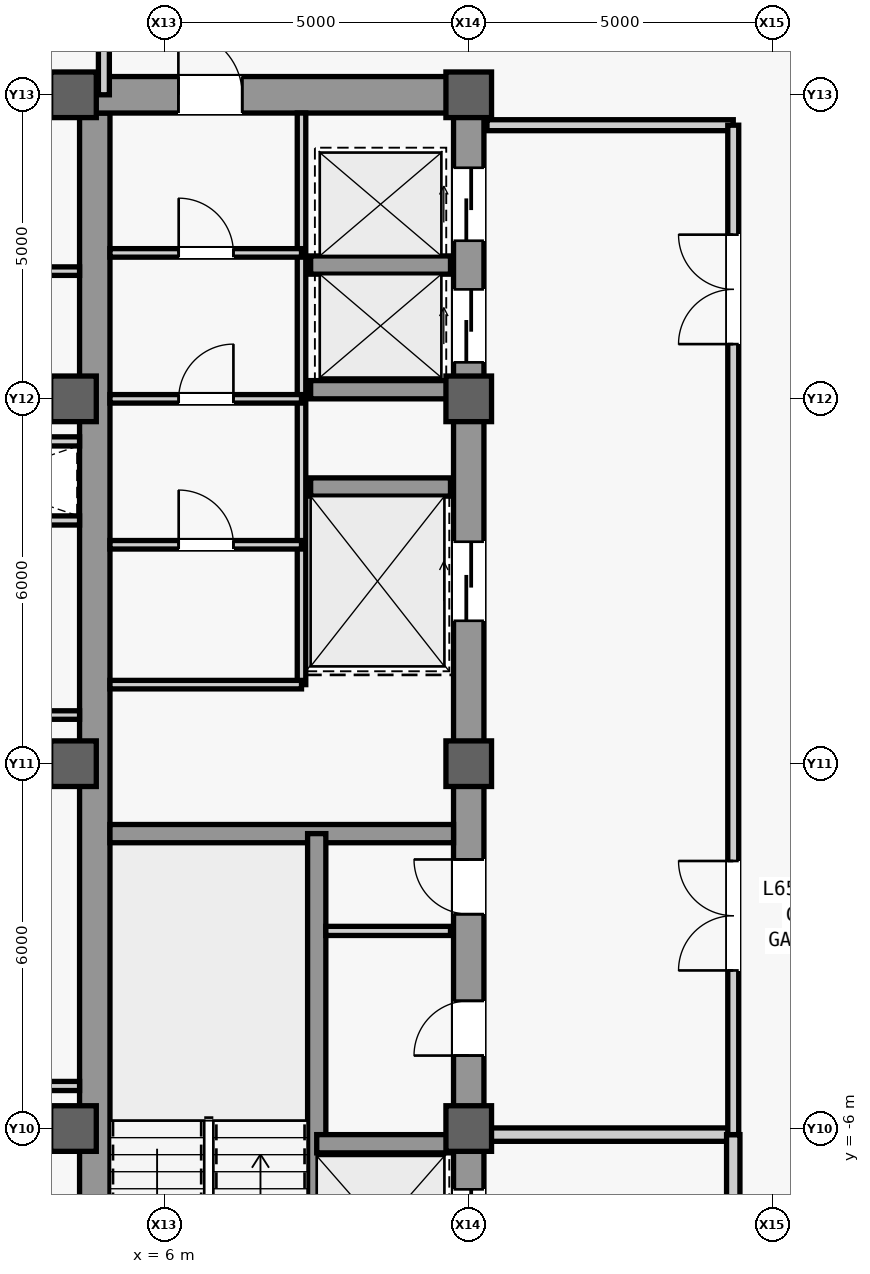
"""IFC4 building model, lengths in metres.
Left out: names, types, materials, properties, quantities, classifications, styles, units other than length and angle.
Written with IfcOpenShell. Run it as: python <this file> out.ifc"""

import sys

from ifc_helpers import new_model, si_unit, direction, frame, frame_2d, origin, origin_2d, place, context, subcontext, project, spatial, rectangle, extrude, source, transform, mapped, element, fill, save


model = new_model("IFC4")
c1 = context("Model", 3, precision=1e-05, world=origin(), true_north=direction((0.0, 1.0)))
c2 = subcontext(c1, "Body", "Model", "MODEL_VIEW")
j1 = project(units=[si_unit("LENGTHUNIT", "METRE"), si_unit("PLANEANGLEUNIT", "RADIAN")], contexts=[c1])
p1 = place(None, origin())
s1 = spatial("IfcSite", under=j1, at=p1, CompositionType="ELEMENT")
p2 = place(p1, origin())
s2 = spatial("IfcBuilding", under=s1, at=p2, CompositionType="ELEMENT")
p3 = place(p2, frame((0.0, 0.0, 277.5)))
s3 = spatial("IfcBuildingStorey", under=s2, at=p3, CompositionType="ELEMENT", Elevation=277.5)
m1 = source(origin(), c2, "Body", "SweptSolid", [
    extrude(rectangle(XDim=22.0, YDim=0.5, at=frame_2d((11.0, 0.0))), origin(), (0.0, 0.0, 1.0), 3.78),
])
p4 = place(p3, frame((11.0, -11.0, 0.0), z_axis=(0.0, 0.0, 1.0), x_axis=(0.0, 1.0, 0.0)))
e1 = element("IfcWall", 1, at=p4, inside=s3, PredefinedType="SHEAR", context=c2, shape_type="MappedRepresentation", body=[
    mapped(m1, transform((0.0, 0.0, 0.0), scale=1.0)),
])
m2 = source(origin(), c2, "Body", "SweptSolid", [
    extrude(rectangle(XDim=1.1, YDim=2.2, at=frame_2d((0.55, 1.1))), frame((0.0, 0.26, 0.0), z_axis=(0.0, -1.0, 0.0), x_axis=(1.0, 0.0, 0.0)), (0.0, 0.0, 1.0), 0.52),
])
p5 = place(p4, frame((0.8, 0.0, 0.0)))
e2 = element("IfcOpeningElement", 2, at=p5, cuts=e1, PredefinedType="OPENING", context=c2, shape_type="MappedRepresentation", body=[
    mapped(m2, transform((0.0, 0.0, 0.0), scale=1.0)),
])
m3 = source(origin(), c2, "Body", "SweptSolid", [
    extrude(rectangle(XDim=0.9, YDim=2.15, at=frame_2d((0.45, 1.075))), frame((0.0, 0.26, 0.0), z_axis=(0.0, -1.0, 0.0), x_axis=(1.0, 0.0, 0.0)), (0.0, 0.0, 1.0), 0.52),
])
p6 = place(p4, frame((6.2, 0.0, 0.0)))
e3 = element("IfcOpeningElement", 3, at=p6, cuts=e1, PredefinedType="OPENING", context=c2, shape_type="MappedRepresentation", body=[
    mapped(m3, transform((0.0, 0.0, 0.0), scale=1.0)),
])
p7 = place(p4, frame((8.525, 0.0, 0.0)))
e4 = element("IfcOpeningElement", 4, at=p7, cuts=e1, PredefinedType="OPENING", context=c2, shape_type="MappedRepresentation", body=[
    mapped(m3, transform((0.0, 0.0, 0.0), scale=1.0)),
])
m4 = source(origin(), c2, "Body", "SweptSolid", [
    extrude(rectangle(XDim=1.2, YDim=2.3, at=frame_2d((0.6, 1.15))), frame((0.0, 0.26, 0.0), z_axis=(0.0, -1.0, 0.0), x_axis=(1.0, 0.0, 0.0)), (0.0, 0.0, 1.0), 0.52),
])
p8 = place(p4, frame((17.6, 0.0, 0.0)))
e5 = element("IfcOpeningElement", 5, at=p8, cuts=e1, PredefinedType="OPENING", context=c2, shape_type="MappedRepresentation", body=[
    mapped(m4, transform((0.0, 0.0, 0.0), scale=1.0)),
])
p9 = place(p4, frame((19.6, 0.0, 0.0)))
e6 = element("IfcOpeningElement", 6, at=p9, cuts=e1, PredefinedType="OPENING", context=c2, shape_type="MappedRepresentation", body=[
    mapped(m4, transform((0.0, 0.0, 0.0), scale=1.0)),
])
m5 = source(origin(), c2, "Body", "SweptSolid", [
    extrude(rectangle(XDim=1.3, YDim=2.3, at=frame_2d((0.65, 1.15))), frame((0.0, 0.26, 0.0), z_axis=(0.0, -1.0, 0.0), x_axis=(1.0, 0.0, 0.0)), (0.0, 0.0, 1.0), 0.52),
])
p10 = place(p4, frame((2.7, 0.0, 0.0)))
e7 = element("IfcOpeningElement", 7, at=p10, cuts=e1, PredefinedType="OPENING", context=c2, shape_type="MappedRepresentation", body=[
    mapped(m5, transform((0.0, 0.0, 0.0), scale=1.0)),
])
p11 = place(p4, frame((13.35, 0.0, 0.0)))
e8 = element("IfcOpeningElement", 8, at=p11, cuts=e1, PredefinedType="OPENING", context=c2, shape_type="MappedRepresentation", body=[
    mapped(m5, transform((0.0, 0.0, 0.0), scale=1.0)),
])
m6 = source(origin(), c2, "Body", "SweptSolid", [
    extrude(rectangle(XDim=21.4, YDim=0.5, at=frame_2d((10.7, 0.0))), origin(), (0.0, 0.0, 1.0), 3.78),
])
p12 = place(p3, frame((4.85, -10.7, 0.0), z_axis=(0.0, 0.0, 1.0), x_axis=(0.0, 1.0, 0.0)))
e9 = element("IfcWall", 9, at=p12, inside=s3, PredefinedType="SHEAR", context=c2, shape_type="MappedRepresentation", body=[
    mapped(m6, transform((0.0, 0.0, 0.0), scale=1.0)),
])
m7 = source(origin(), c2, "Body", "SweptSolid", [
    extrude(rectangle(XDim=5.9, YDim=0.6, at=frame_2d((2.95, 0.0))), origin(), (0.0, 0.0, 1.0), 3.78),
])
p13 = place(p3, frame((4.85, 11.0, 0.0), z_axis=(0.0, 0.0, 1.0), x_axis=(1.0, 0.0, 0.0)))
e10 = element("IfcWall", 10, at=p13, inside=s3, PredefinedType="SHEAR", context=c2, shape_type="MappedRepresentation", body=[
    mapped(m7, transform((0.0, 0.0, 0.0), scale=1.0)),
])
m8 = source(origin(), c2, "Body", "SweptSolid", [
    extrude(rectangle(XDim=1.05, YDim=2.2, at=frame_2d((0.525, 1.1))), frame((0.0, 0.31, 0.0), z_axis=(0.0, -1.0, 0.0), x_axis=(1.0, 0.0, 0.0)), (0.0, 0.0, 1.0), 0.62),
])
p14 = place(p13, frame((1.375, 0.0, 0.0)))
e11 = element("IfcOpeningElement", 11, at=p14, cuts=e10, PredefinedType="OPENING", context=c2, shape_type="MappedRepresentation", body=[
    mapped(m8, transform((0.0, 0.0, 0.0), scale=1.0)),
])
m9 = source(origin(), c2, "Body", "SweptSolid", [
    extrude(rectangle(XDim=5.65, YDim=0.3, at=frame_2d((2.825, 0.0))), origin(), (0.0, 0.0, 1.0), 3.78),
])
p15 = place(p3, frame((5.1, -1.15, 0.0), z_axis=(0.0, 0.0, 1.0), x_axis=(1.0, 0.0, 0.0)))
e12 = element("IfcWall", 12, at=p15, inside=s3, PredefinedType="SHEAR", context=c2, shape_type="MappedRepresentation", body=[
    mapped(m9, transform((0.0, 0.0, 0.0), scale=1.0)),
])
m10 = source(origin(), c2, "Body", "SweptSolid", [
    extrude(rectangle(XDim=9.2, YDim=0.5, at=frame_2d((4.6, 0.0))), origin(), (0.0, 0.0, 1.0), 3.78),
])
p16 = place(p3, frame((-4.6, 11.0, 0.0), z_axis=(0.0, 0.0, 1.0), x_axis=(1.0, 0.0, 0.0)))
e13 = element("IfcWall", 13, at=p16, inside=s3, PredefinedType="SHEAR", context=c2, shape_type="MappedRepresentation", body=[
    mapped(m10, transform((0.0, 0.0, 0.0), scale=1.0)),
])
m11 = source(origin(), c2, "Body", "SweptSolid", [
    extrude(rectangle(XDim=0.75, YDim=0.75, at=origin_2d()), origin(), (0.0, 0.0, 1.0), 4.0),
])
for number, where, z_axis, x_axis in (
    (14, (4.5, -6.0, 0.0), (0.0, 0.0, 1.0), (1.0, 0.0, 0.0)),
    (15, (4.5, 0.0, 0.0), (0.0, 0.0, 1.0), (1.0, 0.0, 0.0)),
    (16, (4.5, 6.0, 0.0), (0.0, 0.0, 1.0), (1.0, 0.0, 0.0)),
    (17, (4.5, 11.0, 0.0), (0.0, 0.0, 1.0), (1.0, 0.0, 0.0)),
    (18, (11.0, -6.0, 0.0), (0.0, 0.0, 1.0), (1.0, 0.0, 0.0)),
    (19, (11.0, 0.0, 0.0), (0.0, 0.0, 1.0), (1.0, 0.0, 0.0)),
    (20, (11.0, 6.0, 0.0), (0.0, 0.0, 1.0), (1.0, 0.0, 0.0)),
    (21, (11.0, 11.0, 0.0), (0.0, 0.0, 1.0), (1.0, 0.0, 0.0)),
):
    element("IfcColumn", number, at=place(p3, frame(where, z_axis=z_axis, x_axis=x_axis)), inside=s3, PredefinedType="COLUMN", context=c2, shape_type="MappedRepresentation", body=[
        mapped(m11, transform((0.0, 0.0, 0.0), scale=1.0)),
    ])
m12 = source(origin(), c2, "Body", "SweptSolid", [
    extrude(rectangle(XDim=7.8, YDim=0.3, at=frame_2d((3.9, 0.0))), origin(), (0.0, 0.0, 1.0), 3.78),
])
p17 = place(p3, frame((8.5, -8.95, 0.0), z_axis=(0.0, 0.0, 1.0), x_axis=(0.0, 1.0, 0.0)))
e22 = element("IfcWall", 22, at=p17, inside=s3, PredefinedType="SHEAR", context=c2, shape_type="MappedRepresentation", body=[
    mapped(m12, transform((0.0, 0.0, 0.0), scale=1.0)),
])
m13 = source(origin(), c2, "Body", "SweptSolid", [
    extrude(rectangle(XDim=2.2, YDim=0.3, at=frame_2d((1.1, 0.0))), origin(), (0.0, 0.0, 1.0), 3.78),
])
p18 = place(p3, frame((8.5, -6.25, 0.0), z_axis=(0.0, 0.0, 1.0), x_axis=(1.0, 0.0, 0.0)))
e23 = element("IfcWall", 23, at=p18, inside=s3, PredefinedType="SHEAR", context=c2, shape_type="MappedRepresentation", body=[
    mapped(m13, transform((0.0, 0.0, 0.0), scale=1.0)),
])
m14 = source(origin(), c2, "Body", "SweptSolid", [
    extrude(rectangle(XDim=2.3, YDim=0.3, at=frame_2d((1.15, 0.0))), origin(), (0.0, 0.0, 1.0), 3.78),
])
for number, where, z_axis, x_axis in (
    (24, (8.4, 4.55, 0.0), (0.0, 0.0, 1.0), (1.0, 0.0, 0.0)),
    (25, (8.4, 6.15, 0.0), (0.0, 0.0, 1.0), (1.0, 0.0, 0.0)),
    (26, (8.4, 8.2, 0.0), (0.0, 0.0, 1.0), (1.0, 0.0, 0.0)),
):
    element("IfcWall", number, at=place(p3, frame(where, z_axis=z_axis, x_axis=x_axis)), inside=s3, PredefinedType="SHEAR", context=c2, shape_type="MappedRepresentation", body=[
        mapped(m14, transform((0.0, 0.0, 0.0), scale=1.0)),
    ])
m15 = source(origin(), c2, "Body", "SweptSolid", [
    extrude(rectangle(XDim=2.05, YDim=0.15, at=frame_2d((1.025, 0.0))), origin(), (0.0, 0.0, 1.0), 3.78),
])
p19 = place(p3, frame((8.65, -2.75, 0.0), z_axis=(0.0, 0.0, 1.0), x_axis=(1.0, 0.0, 0.0)))
e27 = element("IfcWall", 27, at=p19, inside=s3, PredefinedType="PARTITIONING", context=c2, shape_type="MappedRepresentation", body=[
    mapped(m15, transform((0.0, 0.0, 0.0), scale=1.0)),
])
m16 = source(origin(), c2, "Body", "SweptSolid", [
    extrude(rectangle(XDim=9.4, YDim=0.14, at=frame_2d((4.7, 0.0))), origin(), (0.0, 0.0, 1.0), 3.78),
])
p20 = place(p3, frame((8.25, 1.3, 0.0), z_axis=(0.0, 0.0, 1.0), x_axis=(0.0, 1.0, 0.0)))
e28 = element("IfcWall", 28, at=p20, inside=s3, PredefinedType="PARTITIONING", context=c2, shape_type="MappedRepresentation", body=[
    mapped(m16, transform((0.0, 0.0, 0.0), scale=1.0)),
])
m17 = source(origin(), c2, "Body", "SweptSolid", [
    extrude(rectangle(XDim=3.15, YDim=0.14, at=frame_2d((1.575, 0.0))), origin(), (0.0, 0.0, 1.0), 3.78),
])
p21 = place(p3, frame((5.1, 1.3, 0.0), z_axis=(0.0, 0.0, 1.0), x_axis=(1.0, 0.0, 0.0)))
e29 = element("IfcWall", 29, at=p21, inside=s3, PredefinedType="PARTITIONING", context=c2, shape_type="MappedRepresentation", body=[
    mapped(m17, transform((0.0, 0.0, 0.0), scale=1.0)),
])
p22 = place(p3, frame((5.1, 8.4, 0.0), z_axis=(0.0, 0.0, 1.0), x_axis=(1.0, 0.0, 0.0)))
e30 = element("IfcWall", 30, at=p22, inside=s3, PredefinedType="PARTITIONING", context=c2, shape_type="MappedRepresentation", body=[
    mapped(m17, transform((0.0, 0.0, 0.0), scale=1.0)),
])
m18 = source(origin(), c2, "Body", "SweptSolid", [
    extrude(rectangle(XDim=0.9, YDim=2.15, at=frame_2d((0.45, 1.075))), frame((0.0, 0.08, 0.0), z_axis=(0.0, -1.0, 0.0), x_axis=(1.0, 0.0, 0.0)), (0.0, 0.0, 1.0), 0.16),
])
p23 = place(p22, frame((1.13, 0.0, 0.0)))
e31 = element("IfcOpeningElement", 31, at=p23, cuts=e30, PredefinedType="OPENING", context=c2, shape_type="MappedRepresentation", body=[
    mapped(m18, transform((0.0, 0.0, 0.0), scale=1.0)),
])
p24 = place(p3, frame((5.1, 6.0, 0.0), z_axis=(0.0, 0.0, 1.0), x_axis=(1.0, 0.0, 0.0)))
e32 = element("IfcWall", 32, at=p24, inside=s3, PredefinedType="PARTITIONING", context=c2, shape_type="MappedRepresentation", body=[
    mapped(m17, transform((0.0, 0.0, 0.0), scale=1.0)),
])
p25 = place(p24, frame((1.13, 0.0, 0.0)))
e33 = element("IfcOpeningElement", 33, at=p25, cuts=e32, PredefinedType="OPENING", context=c2, shape_type="MappedRepresentation", body=[
    mapped(m18, transform((0.0, 0.0, 0.0), scale=1.0)),
])
p26 = place(p3, frame((5.1, 3.6, 0.0), z_axis=(0.0, 0.0, 1.0), x_axis=(1.0, 0.0, 0.0)))
e34 = element("IfcWall", 34, at=p26, inside=s3, PredefinedType="PARTITIONING", context=c2, shape_type="MappedRepresentation", body=[
    mapped(m17, transform((0.0, 0.0, 0.0), scale=1.0)),
])
p27 = place(p26, frame((1.13, 0.0, 0.0)))
e35 = element("IfcOpeningElement", 35, at=p27, cuts=e34, PredefinedType="OPENING", context=c2, shape_type="MappedRepresentation", body=[
    mapped(m18, transform((0.0, 0.0, 0.0), scale=1.0)),
])
m19 = source(origin(), c2, "Body", "SweptSolid", [
    extrude(rectangle(XDim=4.05, YDim=0.22, at=frame_2d((2.025, 0.0))), origin(), (0.0, 0.0, 1.0), 3.085),
])
p28 = place(p3, frame((11.3, -6.1, 0.0), z_axis=(0.0, 0.0, 1.0), x_axis=(1.0, 0.0, 0.0)))
e36 = element("IfcWall", 36, at=p28, inside=s3, PredefinedType="PARTITIONING", context=c2, shape_type="MappedRepresentation", body=[
    mapped(m19, transform((0.0, 0.0, 0.0), scale=1.0)),
])
m20 = source(origin(), c2, "Body", "SweptSolid", [
    extrude(rectangle(XDim=4.4, YDim=0.22, at=frame_2d((2.2, 0.0))), origin(), (0.0, 0.0, 1.0), 3.78),
])
p29 = place(p3, frame((15.35, -10.5, 0.0), z_axis=(0.0, 0.0, 1.0), x_axis=(0.0, 1.0, 0.0)))
e37 = element("IfcWall", 37, at=p29, inside=s3, PredefinedType="PARTITIONING", context=c2, shape_type="MappedRepresentation", body=[
    mapped(m20, transform((0.0, 0.0, 0.0), scale=1.0)),
])
m21 = source(origin(), c2, "Body", "SweptSolid", [
    extrude(rectangle(XDim=1.2, YDim=2.2, at=frame_2d((0.6, 1.1))), frame((0.0, 0.12, 0.0), z_axis=(0.0, -1.0, 0.0), x_axis=(1.0, 0.0, 0.0)), (0.0, 0.0, 1.0), 0.24),
])
p30 = place(p29, frame((1.6, 0.0, 0.0)))
e38 = element("IfcOpeningElement", 38, at=p30, cuts=e37, PredefinedType="OPENING", context=c2, shape_type="MappedRepresentation", body=[
    mapped(m21, transform((0.0, 0.0, 0.0), scale=1.0)),
])
m22 = source(origin(), c2, "Body", "SweptSolid", [
    extrude(rectangle(XDim=4.05, YDim=0.18, at=frame_2d((2.025, 0.0))), origin(), (0.0, 0.0, 1.0), 3.78),
])
p31 = place(p3, frame((11.3, 10.5, 0.0), z_axis=(0.0, 0.0, 1.0), x_axis=(1.0, 0.0, 0.0)))
e39 = element("IfcWall", 39, at=p31, inside=s3, PredefinedType="PARTITIONING", context=c2, shape_type="MappedRepresentation", body=[
    mapped(m22, transform((0.0, 0.0, 0.0), scale=1.0)),
])
m23 = source(origin(), c2, "Body", "SweptSolid", [
    extrude(rectangle(XDim=16.6, YDim=0.18, at=frame_2d((8.3, 0.0))), origin(), (0.0, 0.0, 1.0), 3.78),
])
p32 = place(p3, frame((15.35, -6.1, 0.0), z_axis=(0.0, 0.0, 1.0), x_axis=(0.0, 1.0, 0.0)))
e40 = element("IfcWall", 40, at=p32, inside=s3, PredefinedType="PARTITIONING", context=c2, shape_type="MappedRepresentation", body=[
    mapped(m23, transform((0.0, 0.0, 0.0), scale=1.0)),
])
m24 = source(origin(), c2, "Body", "SweptSolid", [
    extrude(rectangle(XDim=1.8, YDim=2.25, at=frame_2d((0.9, 1.125))), frame((0.0, 0.1, 0.0), z_axis=(0.0, -1.0, 0.0), x_axis=(1.0, 0.0, 0.0)), (0.0, 0.0, 1.0), 0.2),
])
p33 = place(p32, frame((2.7, 0.0, 0.0)))
e41 = element("IfcOpeningElement", 41, at=p33, cuts=e40, PredefinedType="OPENING", context=c2, shape_type="MappedRepresentation", body=[
    mapped(m24, transform((0.0, 0.0, 0.0), scale=1.0)),
])
p34 = place(p32, frame((13.0, 0.0, 0.0)))
e42 = element("IfcOpeningElement", 42, at=p34, cuts=e40, PredefinedType="OPENING", context=c2, shape_type="MappedRepresentation", body=[
    mapped(m24, transform((0.0, 0.0, 0.0), scale=1.0)),
])
m25 = source(origin(), c2, "Body", "SweptSolid", [
    extrude(rectangle(XDim=3.45, YDim=0.15, at=frame_2d((1.725, 0.0))), origin(), (0.0, 0.0, 1.0), 3.78),
])
for number, where, z_axis, x_axis in (
    (43, (1.15, 4.0, 0.0), (0.0, 0.0, 1.0), (1.0, 0.0, 0.0)),
    (44, (1.15, -5.3, 0.0), (0.0, 0.0, 1.0), (1.0, 0.0, 0.0)),
):
    element("IfcWall", number, at=place(p3, frame(where, z_axis=z_axis, x_axis=x_axis)), inside=s3, PredefinedType="PARTITIONING", context=c2, shape_type="MappedRepresentation", body=[
        mapped(m25, transform((0.0, 0.0, 0.0), scale=1.0)),
    ])
m26 = source(origin(), c2, "Body", "SweptSolid", [
    extrude(rectangle(XDim=3.45, YDim=0.14, at=frame_2d((1.725, 0.0))), origin(), (0.0, 0.0, 1.0), 3.78),
])
p35 = place(p3, frame((1.15, 8.1, 0.0), z_axis=(0.0, 0.0, 1.0), x_axis=(1.0, 0.0, 0.0)))
e45 = element("IfcWall", 45, at=p35, inside=s3, PredefinedType="PARTITIONING", context=c2, shape_type="MappedRepresentation", body=[
    mapped(m26, transform((0.0, 0.0, 0.0), scale=1.0)),
])
p36 = place(p3, frame((1.15, 5.3, 0.0), z_axis=(0.0, 0.0, 1.0), x_axis=(1.0, 0.0, 0.0)))
e46 = element("IfcWall", 46, at=p36, inside=s3, PredefinedType="PARTITIONING", context=c2, shape_type="MappedRepresentation", body=[
    mapped(m25, transform((0.0, 0.0, 0.0), scale=1.0)),
])
p37 = place(p3, frame((1.15, 0.8, 0.0), z_axis=(0.0, 0.0, 1.0), x_axis=(1.0, 0.0, 0.0)))
e47 = element("IfcWall", 47, at=p37, inside=s3, PredefinedType="PARTITIONING", context=c2, shape_type="MappedRepresentation", body=[
    mapped(m26, transform((0.0, 0.0, 0.0), scale=1.0)),
])
m27 = source(origin(), c2, "Body", "SweptSolid", [
    extrude(rectangle(XDim=2.6, YDim=0.18, at=frame_2d((1.3, 0.0))), origin(), (0.0, 0.0, 1.0), 3.78),
])
p38 = place(p3, frame((5.0, 11.0, 0.0), z_axis=(0.0, 0.0, 1.0), x_axis=(0.0, 1.0, 0.0)))
e48 = element("IfcWall", 48, at=p38, inside=s3, PredefinedType="PARTITIONING", context=c2, shape_type="MappedRepresentation", body=[
    mapped(m27, transform((0.0, 0.0, 0.0), scale=1.0)),
])
m28 = source(origin(), c2, "Body", "SweptSolid", [
    extrude(rectangle(XDim=0.9, YDim=2.15, at=frame_2d((0.45, 1.075))), frame((0.0, 0.1, 0.0), z_axis=(0.0, -1.0, 0.0), x_axis=(1.0, 0.0, 0.0)), (0.0, 0.0, 1.0), 0.2),
])
p39 = place(p38, frame((0.85, 0.0, 0.0)))
e49 = element("IfcOpeningElement", 49, at=p39, cuts=e48, PredefinedType="OPENING", context=c2, shape_type="MappedRepresentation", body=[
    mapped(m28, transform((0.0, 0.0, 0.0), scale=1.0)),
])
m29 = source(origin(), c2, "Body", "SweptSolid", [
    extrude(rectangle(XDim=0.9, YDim=2.15, at=frame_2d((0.45, 1.075))), frame((0.0, 0.025, 0.0), z_axis=(0.0, -1.0, 0.0), x_axis=(1.0, 0.0, 0.0)), (0.0, 0.0, 1.0), 0.05),
])
p40 = place(p6, origin())
e50 = element("IfcDoor", 50, at=p40, inside=s3, OperationType="SINGLE_SWING_LEFT", PredefinedType="DOOR", context=c2, shape_type="MappedRepresentation", body=[
    mapped(m29, transform((0.0, 0.0, 0.0), scale=1.0)),
])
fill(e3, e50)
p41 = place(p7, origin())
e51 = element("IfcDoor", 51, at=p41, inside=s3, OperationType="SINGLE_SWING_RIGHT", PredefinedType="DOOR", context=c2, shape_type="MappedRepresentation", body=[
    mapped(m29, transform((0.0, 0.0, 0.0), scale=1.0)),
])
fill(e4, e51)
m30 = source(origin(), c2, "Body", "SweptSolid", [
    extrude(rectangle(XDim=1.05, YDim=2.2, at=frame_2d((0.525, 1.1))), frame((0.0, 0.025, 0.0), z_axis=(0.0, -1.0, 0.0), x_axis=(1.0, 0.0, 0.0)), (0.0, 0.0, 1.0), 0.05),
])
p42 = place(p14, origin())
e52 = element("IfcDoor", 52, at=p42, inside=s3, OperationType="SINGLE_SWING_LEFT", PredefinedType="DOOR", context=c2, shape_type="MappedRepresentation", body=[
    mapped(m30, transform((0.0, 0.0, 0.0), scale=1.0)),
])
fill(e11, e52)
p43 = place(p23, origin())
e53 = element("IfcDoor", 53, at=p43, inside=s3, OperationType="SINGLE_SWING_LEFT", PredefinedType="DOOR", context=c2, shape_type="MappedRepresentation", body=[
    mapped(m29, transform((0.0, 0.0, 0.0), scale=1.0)),
])
fill(e31, e53)
p44 = place(p25, origin())
e54 = element("IfcDoor", 54, at=p44, inside=s3, OperationType="SINGLE_SWING_RIGHT", PredefinedType="DOOR", context=c2, shape_type="MappedRepresentation", body=[
    mapped(m29, transform((0.0, 0.0, 0.0), scale=1.0)),
])
fill(e33, e54)
p45 = place(p27, origin())
e55 = element("IfcDoor", 55, at=p45, inside=s3, OperationType="SINGLE_SWING_LEFT", PredefinedType="DOOR", context=c2, shape_type="MappedRepresentation", body=[
    mapped(m29, transform((0.0, 0.0, 0.0), scale=1.0)),
])
fill(e35, e55)
m31 = source(origin(), c2, "Body", "SweptSolid", [
    extrude(rectangle(XDim=1.8, YDim=2.25, at=frame_2d((0.9, 1.125))), frame((0.0, 0.025, 0.0), z_axis=(0.0, -1.0, 0.0), x_axis=(1.0, 0.0, 0.0)), (0.0, 0.0, 1.0), 0.05),
])
p46 = place(p33, origin())
e56 = element("IfcDoor", 56, at=p46, inside=s3, OperationType="SINGLE_SWING_RIGHT", PredefinedType="DOOR", context=c2, shape_type="MappedRepresentation", body=[
    mapped(m31, transform((0.0, 0.0, 0.0), scale=1.0)),
])
fill(e41, e56)
p47 = place(p34, origin())
e57 = element("IfcDoor", 57, at=p47, inside=s3, OperationType="SINGLE_SWING_LEFT", PredefinedType="DOOR", context=c2, shape_type="MappedRepresentation", body=[
    mapped(m31, transform((0.0, 0.0, 0.0), scale=1.0)),
])
fill(e42, e57)
m32 = source(origin(), c2, "Body", "SweptSolid", [
    extrude(rectangle(XDim=1.2, YDim=2.3, at=frame_2d((0.6, 1.15))), frame((0.0, 0.025, 0.0), z_axis=(0.0, -1.0, 0.0), x_axis=(1.0, 0.0, 0.0)), (0.0, 0.0, 1.0), 0.05),
])
p48 = place(p8, origin())
e58 = element("IfcDoor", 58, at=p48, inside=s3, OperationType="SLIDING_TO_LEFT", PredefinedType="DOOR", context=c2, shape_type="MappedRepresentation", body=[
    mapped(m32, transform((0.0, 0.0, 0.0), scale=1.0)),
])
fill(e5, e58)
p49 = place(p9, origin())
e59 = element("IfcDoor", 59, at=p49, inside=s3, OperationType="SLIDING_TO_LEFT", PredefinedType="DOOR", context=c2, shape_type="MappedRepresentation", body=[
    mapped(m32, transform((0.0, 0.0, 0.0), scale=1.0)),
])
fill(e6, e59)
m33 = source(origin(), c2, "Body", "SweptSolid", [
    extrude(rectangle(XDim=1.3, YDim=2.3, at=frame_2d((0.65, 1.15))), frame((0.0, 0.025, 0.0), z_axis=(0.0, -1.0, 0.0), x_axis=(1.0, 0.0, 0.0)), (0.0, 0.0, 1.0), 0.05),
])
p50 = place(p10, origin())
e60 = element("IfcDoor", 60, at=p50, inside=s3, OperationType="SLIDING_TO_LEFT", PredefinedType="DOOR", context=c2, shape_type="MappedRepresentation", body=[
    mapped(m33, transform((0.0, 0.0, 0.0), scale=1.0)),
])
fill(e7, e60)
p51 = place(p11, origin())
e61 = element("IfcDoor", 61, at=p51, inside=s3, OperationType="SLIDING_TO_LEFT", PredefinedType="DOOR", context=c2, shape_type="MappedRepresentation", body=[
    mapped(m33, transform((0.0, 0.0, 0.0), scale=1.0)),
])
fill(e8, e61)
save(model, sys.argv[1])
